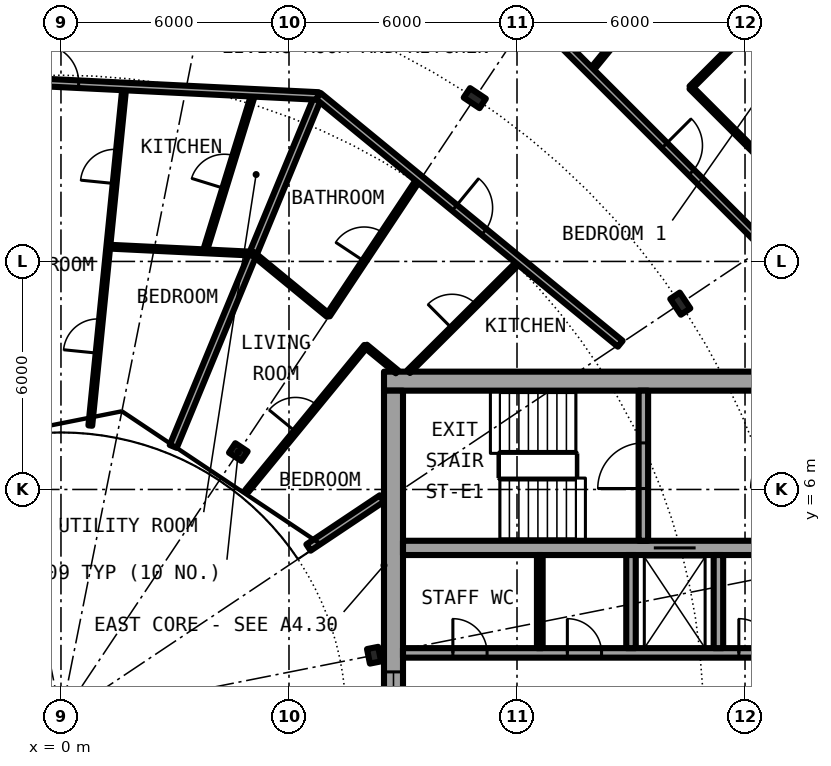
"""IFC4 building model, lengths in metres.
Left out: names, types, materials, properties, quantities, classifications, styles, units other than length and angle.
Written with IfcOpenShell. Run it as: python <this file> out.ifc"""

import sys

from ifc_helpers import new_model, si_unit, direction, frame, frame_2d, origin, origin_2d, place, context, subcontext, project, spatial, rectangle, i_section, extrude, element, fill, save


model = new_model("IFC4")
c1 = context("Model", 3, precision=1e-05, world=origin(), true_north=direction((0.0, 1.0)))
c2 = subcontext(c1, "Body", "Model", "MODEL_VIEW")
j1 = project(units=[si_unit("LENGTHUNIT", "METRE"), si_unit("PLANEANGLEUNIT", "RADIAN")], contexts=[c1])
p1 = place(None, origin())
s1 = spatial("IfcSite", under=j1, at=p1, CompositionType="ELEMENT")
p2 = place(p1, origin())
s2 = spatial("IfcBuilding", under=s1, at=p2, CompositionType="ELEMENT")
p3 = place(p2, frame((0.0, 0.0, 170.75)))
s3 = spatial("IfcBuildingStorey", under=s2, at=p3, CompositionType="ELEMENT", Elevation=170.75)
for number, where, z_axis, x_axis in (
    (1, (16.297, 10.889, 0.0), (0.0, 0.0, 1.0), (0.831, 0.556, 0.0)),
    (2, (10.889, 16.297, 0.0), (0.0, 0.0, 1.0), (0.556, 0.831, 0.0)),
):
    element("IfcColumn", number, at=place(p3, frame(where, z_axis=z_axis, x_axis=x_axis)), inside=s3, PredefinedType="COLUMN", context=c2, shape_type="SweptSolid", body=[
        extrude(i_section(OverallWidth=0.3, OverallDepth=0.5, WebThickness=0.014, FlangeThickness=0.028, FilletRadius=0.027, at=origin_2d()), origin(), (0.0, 0.0, 1.0), 3.05),
    ])
for number, where, z_axis, x_axis in (
    (3, (8.239, 1.639, 0.0), (0.0, 0.0, 1.0), (0.981, 0.195, 0.0)),
    (4, (4.667, 6.984, 0.0), (0.0, 0.0, 1.0), (0.556, 0.831, 0.0)),
):
    element("IfcColumn", number, at=place(p3, frame(where, z_axis=z_axis, x_axis=x_axis)), inside=s3, PredefinedType="COLUMN", context=c2, shape_type="SweptSolid", body=[
        extrude(i_section(OverallWidth=0.3, OverallDepth=0.39, WebThickness=0.011, FlangeThickness=0.019, FilletRadius=0.027, at=origin_2d()), origin(), (0.0, 0.0, 1.0), 3.05),
    ])
p4 = place(p3, frame((22.1, 8.85, 0.0), z_axis=(0.0, 0.0, 1.0), x_axis=(-1.0, 0.0, 0.0)))
e5 = element("IfcWall", 5, at=p4, inside=s3, PredefinedType="SHEAR", context=c2, shape_type="SweptSolid", body=[
    extrude(rectangle(XDim=13.6, YDim=0.5, at=frame_2d((6.8, 0.0))), origin(), (0.0, 0.0, 1.0), 3.05),
])
p5 = place(p4, frame((1.025, 0.0, 0.0)))
e6 = element("IfcOpeningElement", 6, at=p5, cuts=e5, PredefinedType="OPENING", context=c2, shape_type="SweptSolid", body=[
    extrude(rectangle(XDim=1.2, YDim=2.3, at=frame_2d((0.6, 1.15))), frame((0.0, 0.26, 0.0), z_axis=(0.0, -1.0, 0.0), x_axis=(1.0, 0.0, 0.0)), (0.0, 0.0, 1.0), 0.52),
])
p6 = place(p3, frame((8.75, -8.6, 0.0), z_axis=(0.0, 0.0, 1.0), x_axis=(0.0, 1.0, 0.0)))
e7 = element("IfcWall", 7, at=p6, inside=s3, PredefinedType="SHEAR", context=c2, shape_type="SweptSolid", body=[
    extrude(rectangle(XDim=17.2, YDim=0.5, at=frame_2d((8.6, 0.0))), origin(), (0.0, 0.0, 1.0), 3.05),
])
p7 = place(p6, frame((7.4, 0.0, 0.1)))
e8 = element("IfcOpeningElement", 8, at=p7, cuts=e7, PredefinedType="OPENING", context=c2, shape_type="SweptSolid", body=[
    extrude(rectangle(XDim=2.4, YDim=2.2, at=frame_2d((1.2, 1.1))), frame((0.0, 0.26, 0.0), z_axis=(0.0, -1.0, 0.0), x_axis=(1.0, 0.0, 0.0)), (0.0, 0.0, 1.0), 0.52),
])
p8 = place(p3, frame((9.0, 1.7, 0.0), z_axis=(0.0, 0.0, 1.0), x_axis=(1.0, 0.0, 0.0)))
e9 = element("IfcWall", 9, at=p8, inside=s3, PredefinedType="SHEAR", context=c2, shape_type="SweptSolid", body=[
    extrude(rectangle(XDim=10.15, YDim=0.25, at=frame_2d((5.075, 0.0))), origin(), (0.0, 0.0, 1.0), 3.05),
])
p9 = place(p8, frame((1.312, 0.0, 0.0)))
e10 = element("IfcOpeningElement", 10, at=p9, cuts=e9, PredefinedType="OPENING", context=c2, shape_type="SweptSolid", body=[
    extrude(rectangle(XDim=0.9, YDim=2.3, at=frame_2d((0.45, 1.15))), frame((0.0, 0.135, 0.0), z_axis=(0.0, -1.0, 0.0), x_axis=(1.0, 0.0, 0.0)), (0.0, 0.0, 1.0), 0.27),
])
p10 = place(p8, frame((4.325, 0.0, 0.0)))
e11 = element("IfcOpeningElement", 11, at=p10, cuts=e9, PredefinedType="OPENING", context=c2, shape_type="SweptSolid", body=[
    extrude(rectangle(XDim=0.9, YDim=2.3, at=frame_2d((0.45, 1.15))), frame((0.0, 0.135, 0.0), z_axis=(0.0, -1.0, 0.0), x_axis=(1.0, 0.0, 0.0)), (0.0, 0.0, 1.0), 0.27),
])
p11 = place(p8, frame((8.837, 0.0, 0.0)))
e12 = element("IfcOpeningElement", 12, at=p11, cuts=e9, PredefinedType="OPENING", context=c2, shape_type="SweptSolid", body=[
    extrude(rectangle(XDim=0.9, YDim=2.3, at=frame_2d((0.45, 1.15))), frame((0.0, 0.135, 0.0), z_axis=(0.0, -1.0, 0.0), x_axis=(1.0, 0.0, 0.0)), (0.0, 0.0, 1.0), 0.27),
])
p12 = place(p3, frame((9.0, 4.462, 0.0), z_axis=(0.0, 0.0, 1.0), x_axis=(1.0, 0.0, 0.0)))
e13 = element("IfcWall", 13, at=p12, inside=s3, PredefinedType="SHEAR", context=c2, shape_type="SweptSolid", body=[
    extrude(rectangle(XDim=10.15, YDim=0.375, at=frame_2d((5.075, 0.0))), origin(), (0.0, 0.0, 1.0), 3.05),
])
p13 = place(p12, frame((6.6, 0.0, 0.0)))
e14 = element("IfcOpeningElement", 14, at=p13, cuts=e13, PredefinedType="OPENING", context=c2, shape_type="SweptSolid", body=[
    extrude(rectangle(XDim=1.1, YDim=2.3, at=frame_2d((0.55, 1.15))), frame((0.0, 0.198, 0.0), z_axis=(0.0, -1.0, 0.0), x_axis=(1.0, 0.0, 0.0)), (0.0, 0.0, 1.0), 0.395),
])
p14 = place(p3, frame((15.325, 4.65, 0.0), z_axis=(0.0, 0.0, 1.0), x_axis=(0.0, 1.0, 0.0)))
e15 = element("IfcWall", 15, at=p14, inside=s3, PredefinedType="SHEAR", context=c2, shape_type="SweptSolid", body=[
    extrude(rectangle(XDim=3.95, YDim=0.25, at=frame_2d((1.975, 0.0))), origin(), (0.0, 0.0, 1.0), 3.05),
])
p15 = place(p14, frame((1.375, 0.0, 0.0)))
e16 = element("IfcOpeningElement", 16, at=p15, cuts=e15, PredefinedType="OPENING", context=c2, shape_type="SweptSolid", body=[
    extrude(rectangle(XDim=1.2, YDim=2.3, at=frame_2d((0.6, 1.15))), frame((0.0, 0.135, 0.0), z_axis=(0.0, -1.0, 0.0), x_axis=(1.0, 0.0, 0.0)), (0.0, 0.0, 1.0), 0.27),
])
for number, where, z_axis, x_axis in (
    (17, (15.0, 1.825, 0.0), (0.0, 0.0, 1.0), (0.0, 1.0, 0.0)),
    (18, (17.3, 1.825, 0.0), (0.0, 0.0, 1.0), (0.0, 1.0, 0.0)),
):
    element("IfcWall", number, at=place(p3, frame(where, z_axis=z_axis, x_axis=x_axis)), inside=s3, PredefinedType="SOLIDWALL", context=c2, shape_type="SweptSolid", body=[
        extrude(rectangle(XDim=2.45, YDim=0.25, at=frame_2d((1.225, 0.0))), origin(), (0.0, 0.0, 1.0), 2.7),
    ])
p16 = place(p3, frame((12.6, 1.825, 0.0), z_axis=(0.0, 0.0, 1.0), x_axis=(0.0, 1.0, 0.0)))
e19 = element("IfcWall", 19, at=p16, inside=s3, PredefinedType="PARTITIONING", context=c2, shape_type="SweptSolid", body=[
    extrude(rectangle(XDim=2.45, YDim=0.15, at=frame_2d((1.225, 0.0))), origin(), (0.0, 0.0, 1.0), 2.7),
])
p17 = place(p3, frame((0.772, 7.681, 0.0), z_axis=(0.0, 0.0, 1.0), x_axis=(0.100029361081, 0.994984485769, 0.0)))
e20 = element("IfcWall", 20, at=p17, inside=s3, PredefinedType="PARTITIONING", context=c2, shape_type="SweptSolid", body=[
    extrude(rectangle(XDim=8.967, YDim=0.1, at=frame_2d((4.483, 0.0))), origin(), (0.0, 0.0, 1.0), 2.7),
])
p18 = place(p17, frame((6.4, 0.0, 0.0)))
e21 = element("IfcOpeningElement", 21, at=p18, cuts=e20, PredefinedType="OPENING", context=c2, shape_type="SweptSolid", body=[
    extrude(rectangle(XDim=0.9, YDim=2.3, at=frame_2d((0.45, 1.15))), frame((0.0, 0.06, 0.0), z_axis=(0.0, -1.0, 0.0), x_axis=(1.0, 0.0, 0.0)), (0.0, 0.0, 1.0), 0.12),
])
p19 = place(p17, frame((1.915, 0.0, 0.0)))
e22 = element("IfcOpeningElement", 22, at=p19, cuts=e20, PredefinedType="OPENING", context=c2, shape_type="SweptSolid", body=[
    extrude(rectangle(XDim=0.9, YDim=2.3, at=frame_2d((0.45, 1.15))), frame((0.0, 0.06, 0.0), z_axis=(0.0, -1.0, 0.0), x_axis=(1.0, 0.0, 0.0)), (0.0, 0.0, 1.0), 0.12),
])
p20 = place(p3, frame((2.954, 7.132, 0.0), z_axis=(0.0, 0.0, 1.0), x_axis=(0.382632652025, 0.923900564782, 0.0)))
e23 = element("IfcWall", 23, at=p20, inside=s3, PredefinedType="PARTITIONING", context=c2, shape_type="SweptSolid", body=[
    extrude(rectangle(XDim=9.98, YDim=0.2, at=frame_2d((4.99, 0.0))), origin(), (0.0, 0.0, 1.0), 2.7),
])
p21 = place(p3, frame((3.785, 12.266, 0.0), z_axis=(0.0, 0.0, 1.0), x_axis=(0.294934866503, 0.955517359612, 0.0)))
e24 = element("IfcWall", 24, at=p21, inside=s3, PredefinedType="PARTITIONING", context=c2, shape_type="SweptSolid", body=[
    extrude(rectangle(XDim=4.364, YDim=0.1, at=frame_2d((2.182, 0.0))), origin(), (0.0, 0.0, 1.0), 2.7),
])
p22 = place(p21, frame((1.732, 0.0, 0.0)))
e25 = element("IfcOpeningElement", 25, at=p22, cuts=e24, PredefinedType="OPENING", context=c2, shape_type="SweptSolid", body=[
    extrude(rectangle(XDim=0.9, YDim=2.3, at=frame_2d((0.45, 1.15))), frame((0.0, 0.06, 0.0), z_axis=(0.0, -1.0, 0.0), x_axis=(1.0, 0.0, 0.0)), (0.0, 0.0, 1.0), 0.12),
])
p23 = place(p3, frame((4.898, 5.968, 0.0), z_axis=(0.0, 0.0, 1.0), x_axis=(0.634401778971, 0.773003481776, 0.0)))
e26 = element("IfcWall", 26, at=p23, inside=s3, PredefinedType="PARTITIONING", context=c2, shape_type="SweptSolid", body=[
    extrude(rectangle(XDim=4.92, YDim=0.1, at=frame_2d((2.46, 0.0))), origin(), (0.0, 0.0, 1.0), 2.7),
])
p24 = place(p23, frame((2.01, 0.0, 0.0)))
e27 = element("IfcOpeningElement", 27, at=p24, cuts=e26, PredefinedType="OPENING", context=c2, shape_type="SweptSolid", body=[
    extrude(rectangle(XDim=0.9, YDim=2.3, at=frame_2d((0.45, 1.15))), frame((0.0, 0.06, 0.0), z_axis=(0.0, -1.0, 0.0), x_axis=(1.0, 0.0, 0.0)), (0.0, 0.0, 1.0), 0.12),
])
p25 = place(p3, frame((7.031, 10.582, 0.0), z_axis=(0.0, 0.0, 1.0), x_axis=(0.553303732327, 0.832979579457, 0.0)))
e28 = element("IfcWall", 28, at=p25, inside=s3, PredefinedType="PARTITIONING", context=c2, shape_type="SweptSolid", body=[
    extrude(rectangle(XDim=4.319, YDim=0.1, at=frame_2d((2.16, 0.0))), origin(), (0.0, 0.0, 1.0), 2.7),
])
p26 = place(p25, frame((1.71, 0.0, 0.0)))
e29 = element("IfcOpeningElement", 29, at=p26, cuts=e28, PredefinedType="OPENING", context=c2, shape_type="SweptSolid", body=[
    extrude(rectangle(XDim=0.9, YDim=2.3, at=frame_2d((0.45, 1.15))), frame((0.0, 0.06, 0.0), z_axis=(0.0, -1.0, 0.0), x_axis=(1.0, 0.0, 0.0)), (0.0, 0.0, 1.0), 0.12),
])
p27 = place(p3, frame((9.148, 9.1, 0.0), z_axis=(0.0, 0.0, 1.0), x_axis=(0.708822693149, 0.705386695138, 0.0)))
e30 = element("IfcWall", 30, at=p27, inside=s3, PredefinedType="PARTITIONING", context=c2, shape_type="SweptSolid", body=[
    extrude(rectangle(XDim=4.121, YDim=0.1, at=frame_2d((2.061, 0.0))), origin(), (0.0, 0.0, 1.0), 2.7),
])
p28 = place(p27, frame((1.611, 0.0, 0.0)))
e31 = element("IfcOpeningElement", 31, at=p28, cuts=e30, PredefinedType="OPENING", context=c2, shape_type="SweptSolid", body=[
    extrude(rectangle(XDim=0.9, YDim=2.3, at=frame_2d((0.45, 1.15))), frame((0.0, 0.06, 0.0), z_axis=(0.0, -1.0, 0.0), x_axis=(1.0, 0.0, 0.0)), (0.0, 0.0, 1.0), 0.12),
])
p29 = place(p3, frame((13.93, 17.001, 0.0), z_axis=(0.0, 0.0, 1.0), x_axis=(0.633633636523, 0.773633255921, 0.0)))
e32 = element("IfcWall", 32, at=p29, inside=s3, PredefinedType="PARTITIONING", context=c2, shape_type="SweptSolid", body=[
    extrude(rectangle(XDim=1.578, YDim=0.1, at=frame_2d((0.789, 0.0))), origin(), (0.0, 0.0, 1.0), 2.7),
])
p30 = place(p3, frame((16.575, 16.575, 0.0), z_axis=(0.0, 0.0, 1.0), x_axis=(0.707106781187, 0.707106781187, 0.0)))
e33 = element("IfcWall", 33, at=p30, inside=s3, PredefinedType="PARTITIONING", context=c2, shape_type="SweptSolid", body=[
    extrude(rectangle(XDim=3.735, YDim=0.1, at=frame_2d((1.868, 0.0))), origin(), (0.0, 0.0, 1.0), 2.7),
])
p31 = place(p30, frame((1.417, 0.0, 0.0)))
e34 = element("IfcOpeningElement", 34, at=p31, cuts=e33, PredefinedType="OPENING", context=c2, shape_type="SweptSolid", body=[
    extrude(rectangle(XDim=0.9, YDim=2.3, at=frame_2d((0.45, 1.15))), frame((0.0, 0.06, 0.0), z_axis=(0.0, -1.0, 0.0), x_axis=(1.0, 0.0, 0.0)), (0.0, 0.0, 1.0), 0.12),
])
p32 = place(p3, frame((6.513, 4.472, 0.0), z_axis=(0.0, 0.0, 1.0), x_axis=(0.83133816625, 0.555766905579, 0.0)))
e35 = element("IfcWall", 35, at=p32, inside=s3, PredefinedType="PARTITIONING", context=c2, shape_type="SweptSolid", body=[
    extrude(rectangle(XDim=2.323, YDim=0.2, at=frame_2d((1.162, 0.0))), origin(), (0.0, 0.0, 1.0), 2.7),
])
p33 = place(p3, frame((1.24, 12.39, 0.0), z_axis=(0.0, 0.0, 1.0), x_axis=(0.998816217325, -0.048643231882, 0.0)))
e36 = element("IfcWall", 36, at=p33, inside=s3, PredefinedType="PARTITIONING", context=c2, shape_type="SweptSolid", body=[
    extrude(rectangle(XDim=3.82, YDim=0.1, at=frame_2d((1.91, 0.0))), origin(), (0.0, 0.0, 1.0), 2.7),
])
p34 = place(p3, frame((5.058, 12.203, 0.0), z_axis=(0.0, 0.0, 1.0), x_axis=(0.772764723682, -0.634692588449, 0.0)))
e37 = element("IfcWall", 37, at=p34, inside=s3, PredefinedType="PARTITIONING", context=c2, shape_type="SweptSolid", body=[
    extrude(rectangle(XDim=2.557, YDim=0.1, at=frame_2d((1.278, 0.0))), origin(), (0.0, 0.0, 1.0), 2.7),
])
p35 = place(p3, frame((8.019, 9.771, 0.0), z_axis=(0.0, 0.0, 1.0), x_axis=(0.772730269942, -0.634734534995, 0.0)))
e38 = element("IfcWall", 38, at=p35, inside=s3, PredefinedType="PARTITIONING", context=c2, shape_type="SweptSolid", body=[
    extrude(rectangle(XDim=1.065, YDim=0.1, at=frame_2d((0.532, 0.0))), origin(), (0.0, 0.0, 1.0), 2.7),
])
p36 = place(p3, frame((-5.137, 16.938, 0.0), z_axis=(0.0, 0.0, 1.0), x_axis=(0.99879704719, -0.04903527836, 0.0)))
e39 = element("IfcWall", 39, at=p36, inside=s3, PredefinedType="PARTITIONING", context=c2, shape_type="SweptSolid", body=[
    extrude(rectangle(XDim=11.929, YDim=0.2, at=frame_2d((5.965, 0.0))), origin(), (0.0, 0.0, 1.0), 2.7),
])
p37 = place(p36, frame((4.608, 0.0, 0.0)))
e40 = element("IfcOpeningElement", 40, at=p37, cuts=e39, PredefinedType="OPENING", context=c2, shape_type="SweptSolid", body=[
    extrude(rectangle(XDim=1.0, YDim=2.3, at=frame_2d((0.5, 1.15))), frame((0.0, 0.11, 0.0), z_axis=(0.0, -1.0, 0.0), x_axis=(1.0, 0.0, 0.0)), (0.0, 0.0, 1.0), 0.22),
])
p38 = place(p3, frame((6.773, 16.353, 0.0), z_axis=(0.0, 0.0, 1.0), x_axis=(0.773034536097, -0.634363938131, 0.0)))
e41 = element("IfcWall", 41, at=p38, inside=s3, PredefinedType="PARTITIONING", context=c2, shape_type="SweptSolid", body=[
    extrude(rectangle(XDim=10.277, YDim=0.2, at=frame_2d((5.138, 0.0))), origin(), (0.0, 0.0, 1.0), 2.7),
])
p39 = place(p38, frame((4.638, 0.0, 0.0)))
e42 = element("IfcOpeningElement", 42, at=p39, cuts=e41, PredefinedType="OPENING", context=c2, shape_type="SweptSolid", body=[
    extrude(rectangle(XDim=1.0, YDim=2.3, at=frame_2d((0.5, 1.15))), frame((0.0, 0.11, 0.0), z_axis=(0.0, -1.0, 0.0), x_axis=(1.0, 0.0, 0.0)), (0.0, 0.0, 1.0), 0.22),
])
p40 = place(p3, frame((12.389, 18.542, 0.0), z_axis=(0.0, 0.0, 1.0), x_axis=(0.707106781187, -0.707106781187, 0.0)))
e43 = element("IfcWall", 43, at=p40, inside=s3, PredefinedType="PARTITIONING", context=c2, shape_type="SweptSolid", body=[
    extrude(rectangle(XDim=8.702, YDim=0.2, at=frame_2d((4.351, 0.0))), origin(), (0.0, 0.0, 1.0), 2.7),
])
p41 = place(p40, frame((4.938, 0.0, 0.0)))
e44 = element("IfcOpeningElement", 44, at=p41, cuts=e43, PredefinedType="OPENING", context=c2, shape_type="SweptSolid", body=[
    extrude(rectangle(XDim=1.0, YDim=2.3, at=frame_2d((0.5, 1.15))), frame((0.0, 0.11, 0.0), z_axis=(0.0, -1.0, 0.0), x_axis=(1.0, 0.0, 0.0)), (0.0, 0.0, 1.0), 0.22),
])
p42 = place(p3, frame((16.575, 16.575, 0.0), z_axis=(0.0, 0.0, 1.0), x_axis=(0.707132961115, -0.707080600289, 0.0)))
e45 = element("IfcWall", 45, at=p42, inside=s3, PredefinedType="PARTITIONING", context=c2, shape_type="SweptSolid", body=[
    extrude(rectangle(XDim=4.663, YDim=0.1, at=frame_2d((2.331, 0.0))), origin(), (0.0, 0.0, 1.0), 2.7),
])
p43 = place(p42, frame((3.043, 0.0, 0.0)))
e46 = element("IfcOpeningElement", 46, at=p43, cuts=e45, PredefinedType="OPENING", context=c2, shape_type="SweptSolid", body=[
    extrude(rectangle(XDim=0.9, YDim=2.3, at=frame_2d((0.45, 1.15))), frame((0.0, 0.06, 0.0), z_axis=(0.0, -1.0, 0.0), x_axis=(1.0, 0.0, 0.0)), (0.0, 0.0, 1.0), 0.12),
])
p44 = place(p13, origin())
e47 = element("IfcDoor", 47, at=p44, inside=s3, OperationType="DOUBLE_DOOR_SLIDING", PredefinedType="DOOR", context=c2, shape_type="SweptSolid", body=[
    extrude(rectangle(XDim=1.1, YDim=2.3, at=frame_2d((0.55, 1.15))), frame((0.0, 0.025, 0.0), z_axis=(0.0, -1.0, 0.0), x_axis=(1.0, 0.0, 0.0)), (0.0, 0.0, 1.0), 0.05),
])
fill(e14, e47)
p45 = place(p9, origin())
e48 = element("IfcDoor", 48, at=p45, inside=s3, OperationType="SINGLE_SWING_RIGHT", PredefinedType="DOOR", context=c2, shape_type="SweptSolid", body=[
    extrude(rectangle(XDim=0.9, YDim=2.3, at=frame_2d((0.45, 1.15))), frame((0.0, 0.025, 0.0), z_axis=(0.0, -1.0, 0.0), x_axis=(1.0, 0.0, 0.0)), (0.0, 0.0, 1.0), 0.05),
])
fill(e10, e48)
p46 = place(p10, origin())
e49 = element("IfcDoor", 49, at=p46, inside=s3, OperationType="SINGLE_SWING_RIGHT", PredefinedType="DOOR", context=c2, shape_type="SweptSolid", body=[
    extrude(rectangle(XDim=0.9, YDim=2.3, at=frame_2d((0.45, 1.15))), frame((0.0, 0.025, 0.0), z_axis=(0.0, -1.0, 0.0), x_axis=(1.0, 0.0, 0.0)), (0.0, 0.0, 1.0), 0.05),
])
fill(e11, e49)
p47 = place(p11, origin())
e50 = element("IfcDoor", 50, at=p47, inside=s3, OperationType="SINGLE_SWING_LEFT", PredefinedType="DOOR", context=c2, shape_type="SweptSolid", body=[
    extrude(rectangle(XDim=0.9, YDim=2.3, at=frame_2d((0.45, 1.15))), frame((0.0, 0.025, 0.0), z_axis=(0.0, -1.0, 0.0), x_axis=(1.0, 0.0, 0.0)), (0.0, 0.0, 1.0), 0.05),
])
fill(e12, e50)
p48 = place(p15, origin())
e51 = element("IfcDoor", 51, at=p48, inside=s3, OperationType="SINGLE_SWING_LEFT", PredefinedType="DOOR", context=c2, shape_type="SweptSolid", body=[
    extrude(rectangle(XDim=1.2, YDim=2.3, at=frame_2d((0.6, 1.15))), frame((0.0, 0.025, 0.0), z_axis=(0.0, -1.0, 0.0), x_axis=(1.0, 0.0, 0.0)), (0.0, 0.0, 1.0), 0.05),
])
fill(e16, e51)
p49 = place(p7, origin())
e52 = element("IfcWindow", 52, at=p49, inside=s3, PartitioningType="SINGLE_PANEL", PredefinedType="WINDOW", context=c2, shape_type="SweptSolid", body=[
    extrude(rectangle(XDim=2.4, YDim=2.2, at=frame_2d((1.2, 1.1))), frame((0.0, 0.03, 0.0), z_axis=(0.0, -1.0, 0.0), x_axis=(1.0, 0.0, 0.0)), (0.0, 0.0, 1.0), 0.06),
])
fill(e8, e52)
p50 = place(p41, origin())
e53 = element("IfcDoor", 53, at=p50, inside=s3, OperationType="SINGLE_SWING_RIGHT", PredefinedType="DOOR", context=c2, shape_type="SweptSolid", body=[
    extrude(rectangle(XDim=1.0, YDim=2.3, at=frame_2d((0.5, 1.15))), frame((0.0, 0.025, 0.0), z_axis=(0.0, -1.0, 0.0), x_axis=(1.0, 0.0, 0.0)), (0.0, 0.0, 1.0), 0.05),
])
fill(e44, e53)
p51 = place(p39, origin())
e54 = element("IfcDoor", 54, at=p51, inside=s3, OperationType="SINGLE_SWING_RIGHT", PredefinedType="DOOR", context=c2, shape_type="SweptSolid", body=[
    extrude(rectangle(XDim=1.0, YDim=2.3, at=frame_2d((0.5, 1.15))), frame((0.0, 0.025, 0.0), z_axis=(0.0, -1.0, 0.0), x_axis=(1.0, 0.0, 0.0)), (0.0, 0.0, 1.0), 0.05),
])
fill(e42, e54)
p52 = place(p26, origin())
e55 = element("IfcDoor", 55, at=p52, inside=s3, OperationType="SINGLE_SWING_LEFT", PredefinedType="DOOR", context=c2, shape_type="SweptSolid", body=[
    extrude(rectangle(XDim=0.9, YDim=2.3, at=frame_2d((0.45, 1.15))), frame((0.0, 0.025, 0.0), z_axis=(0.0, -1.0, 0.0), x_axis=(1.0, 0.0, 0.0)), (0.0, 0.0, 1.0), 0.05),
])
fill(e29, e55)
p53 = place(p28, origin())
e56 = element("IfcDoor", 56, at=p53, inside=s3, OperationType="SINGLE_SWING_LEFT", PredefinedType="DOOR", context=c2, shape_type="SweptSolid", body=[
    extrude(rectangle(XDim=0.9, YDim=2.3, at=frame_2d((0.45, 1.15))), frame((0.0, 0.025, 0.0), z_axis=(0.0, -1.0, 0.0), x_axis=(1.0, 0.0, 0.0)), (0.0, 0.0, 1.0), 0.05),
])
fill(e31, e56)
p54 = place(p24, origin())
e57 = element("IfcDoor", 57, at=p54, inside=s3, OperationType="SINGLE_SWING_RIGHT", PredefinedType="DOOR", context=c2, shape_type="SweptSolid", body=[
    extrude(rectangle(XDim=0.9, YDim=2.3, at=frame_2d((0.45, 1.15))), frame((0.0, 0.025, 0.0), z_axis=(0.0, -1.0, 0.0), x_axis=(1.0, 0.0, 0.0)), (0.0, 0.0, 1.0), 0.05),
])
fill(e27, e57)
p55 = place(p37, origin())
e58 = element("IfcDoor", 58, at=p55, inside=s3, OperationType="SINGLE_SWING_LEFT", PredefinedType="DOOR", context=c2, shape_type="SweptSolid", body=[
    extrude(rectangle(XDim=1.0, YDim=2.3, at=frame_2d((0.5, 1.15))), frame((0.0, 0.025, 0.0), z_axis=(0.0, -1.0, 0.0), x_axis=(1.0, 0.0, 0.0)), (0.0, 0.0, 1.0), 0.05),
])
fill(e40, e58)
p56 = place(p18, origin())
e59 = element("IfcDoor", 59, at=p56, inside=s3, OperationType="SINGLE_SWING_RIGHT", PredefinedType="DOOR", context=c2, shape_type="SweptSolid", body=[
    extrude(rectangle(XDim=0.9, YDim=2.3, at=frame_2d((0.45, 1.15))), frame((0.0, 0.025, 0.0), z_axis=(0.0, -1.0, 0.0), x_axis=(1.0, 0.0, 0.0)), (0.0, 0.0, 1.0), 0.05),
])
fill(e21, e59)
p57 = place(p22, origin())
e60 = element("IfcDoor", 60, at=p57, inside=s3, OperationType="SINGLE_SWING_LEFT", PredefinedType="DOOR", context=c2, shape_type="SweptSolid", body=[
    extrude(rectangle(XDim=0.9, YDim=2.3, at=frame_2d((0.45, 1.15))), frame((0.0, 0.025, 0.0), z_axis=(0.0, -1.0, 0.0), x_axis=(1.0, 0.0, 0.0)), (0.0, 0.0, 1.0), 0.05),
])
fill(e25, e60)
p58 = place(p19, origin())
e61 = element("IfcDoor", 61, at=p58, inside=s3, OperationType="SINGLE_SWING_LEFT", PredefinedType="DOOR", context=c2, shape_type="SweptSolid", body=[
    extrude(rectangle(XDim=0.9, YDim=2.3, at=frame_2d((0.45, 1.15))), frame((0.0, 0.025, 0.0), z_axis=(0.0, -1.0, 0.0), x_axis=(1.0, 0.0, 0.0)), (0.0, 0.0, 1.0), 0.05),
])
fill(e22, e61)
save(model, sys.argv[1])
